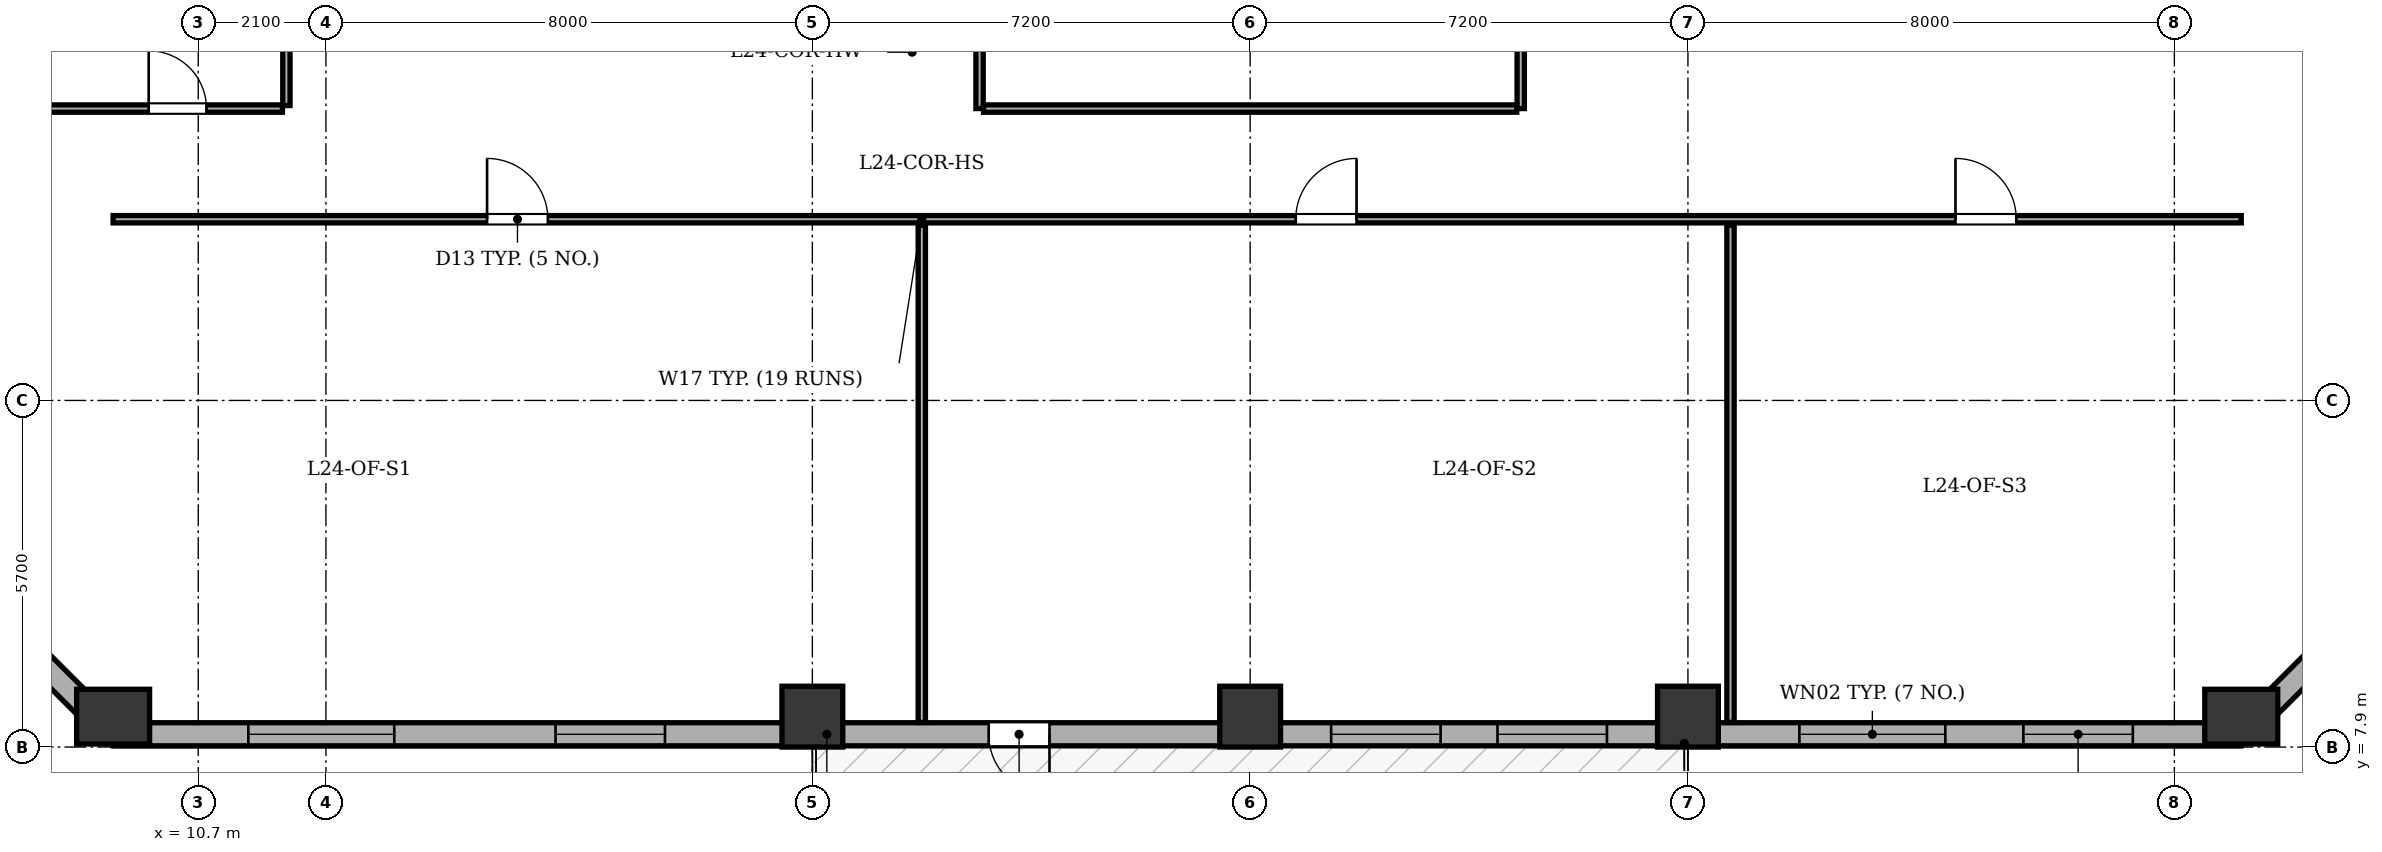
"""IFC4 building model, lengths in metres.
Left out: names, types, materials, properties, quantities, classifications, styles, units other than length and angle.
Written with IfcOpenShell. Run it as: python <this file> out.ifc"""

import sys

from ifc_helpers import new_model, si_unit, direction, frame, frame_2d, origin, origin_2d, place, context, subcontext, project, spatial, rectangle, extrude, element, fill, save


model = new_model("IFC4")
c1 = context("Model", 3, precision=1e-05, world=origin(), true_north=direction((0.0, 1.0)))
c2 = subcontext(c1, "Body", "Model", "MODEL_VIEW")
j1 = project(units=[si_unit("LENGTHUNIT", "METRE"), si_unit("PLANEANGLEUNIT", "RADIAN")], contexts=[c1])
p1 = place(None, origin())
s1 = spatial("IfcSite", under=j1, at=p1, CompositionType="ELEMENT")
p2 = place(p1, origin())
s2 = spatial("IfcBuilding", under=s1, at=p2, CompositionType="ELEMENT")
p3 = place(p2, frame((0.0, 0.0, 98.4)))
s3 = spatial("IfcBuildingStorey", under=s2, at=p3, CompositionType="ELEMENT", Elevation=98.4)
p4 = place(p3, frame((9.3, 8.4, 0.0), z_axis=(0.0, 0.0, 1.0), x_axis=(1.0, 0.0, 0.0)))
e1 = element("IfcColumn", 1, at=p4, inside=s3, PredefinedType="COLUMN", context=c2, shape_type="SweptSolid", body=[
    extrude(rectangle(XDim=0.9, YDim=1.2, at=origin_2d()), origin(), (0.0, 0.0, 1.0), 3.9),
])
for number, where, z_axis, x_axis in (
    (2, (20.8, 8.4, 0.0), (0.0, 0.0, 1.0), (1.0, 0.0, 0.0)),
    (3, (28.0, 8.4, 0.0), (0.0, 0.0, 1.0), (1.0, 0.0, 0.0)),
    (4, (35.2, 8.4, 0.0), (0.0, 0.0, 1.0), (1.0, 0.0, 0.0)),
):
    element("IfcColumn", number, at=place(p3, frame(where, z_axis=z_axis, x_axis=x_axis)), inside=s3, PredefinedType="COLUMN", context=c2, shape_type="SweptSolid", body=[
        extrude(rectangle(XDim=1.0, YDim=1.0, at=origin_2d()), origin(), (0.0, 0.0, 1.0), 3.9),
    ])
p5 = place(p3, frame((44.3, 8.4, 0.0), z_axis=(0.0, 0.0, 1.0), x_axis=(1.0, 0.0, 0.0)))
e5 = element("IfcColumn", 5, at=p5, inside=s3, PredefinedType="COLUMN", context=c2, shape_type="SweptSolid", body=[
    extrude(rectangle(XDim=0.9, YDim=1.2, at=origin_2d()), origin(), (0.0, 0.0, 1.0), 3.9),
])
p6 = place(p3, frame((44.3, 8.11, 0.0), z_axis=(0.0, 0.0, 1.0), x_axis=(-1.0, 0.0, 0.0)))
e6 = element("IfcWall", 6, at=p6, inside=s3, PredefinedType="STANDARD", context=c2, shape_type="SweptSolid", body=[
    extrude(rectangle(XDim=35.0, YDim=0.38, at=frame_2d((17.5, 0.0))), origin(), (0.0, 0.0, 1.0), 3.135),
])
p7 = place(p6, frame((19.6, 0.0, 0.0)))
e7 = element("IfcOpeningElement", 7, at=p7, cuts=e6, PredefinedType="OPENING", context=c2, shape_type="SweptSolid", body=[
    extrude(rectangle(XDim=1.0, YDim=2.02, at=frame_2d((0.5, 1.01))), frame((0.0, 0.2, 0.0), z_axis=(0.0, -1.0, 0.0), x_axis=(1.0, 0.0, 0.0)), (0.0, 0.0, 1.0), 0.4),
])
p8 = place(p6, frame((1.783, 0.0, 0.8)))
e8 = element("IfcOpeningElement", 8, at=p8, cuts=e6, PredefinedType="OPENING", context=c2, shape_type="SweptSolid", body=[
    extrude(rectangle(XDim=1.8, YDim=1.9, at=frame_2d((0.9, 0.95))), frame((0.0, 0.2, 0.0), z_axis=(0.0, -1.0, 0.0), x_axis=(1.0, 0.0, 0.0)), (0.0, 0.0, 1.0), 0.4),
])
p9 = place(p6, frame((4.867, 0.0, 0.8)))
e9 = element("IfcOpeningElement", 9, at=p9, cuts=e6, PredefinedType="OPENING", context=c2, shape_type="SweptSolid", body=[
    extrude(rectangle(XDim=2.4, YDim=1.9, at=frame_2d((1.2, 0.95))), frame((0.0, 0.2, 0.0), z_axis=(0.0, -1.0, 0.0), x_axis=(1.0, 0.0, 0.0)), (0.0, 0.0, 1.0), 0.4),
])
p10 = place(p6, frame((10.432, 0.0, 0.8)))
e10 = element("IfcOpeningElement", 10, at=p10, cuts=e6, PredefinedType="OPENING", context=c2, shape_type="SweptSolid", body=[
    extrude(rectangle(XDim=1.8, YDim=1.9, at=frame_2d((0.9, 0.95))), frame((0.0, 0.2, 0.0), z_axis=(0.0, -1.0, 0.0), x_axis=(1.0, 0.0, 0.0)), (0.0, 0.0, 1.0), 0.4),
])
p11 = place(p6, frame((13.168, 0.0, 0.8)))
e11 = element("IfcOpeningElement", 11, at=p11, cuts=e6, PredefinedType="OPENING", context=c2, shape_type="SweptSolid", body=[
    extrude(rectangle(XDim=1.8, YDim=1.9, at=frame_2d((0.9, 0.95))), frame((0.0, 0.2, 0.0), z_axis=(0.0, -1.0, 0.0), x_axis=(1.0, 0.0, 0.0)), (0.0, 0.0, 1.0), 0.4),
])
p12 = place(p6, frame((25.924, 0.0, 0.8)))
e12 = element("IfcOpeningElement", 12, at=p12, cuts=e6, PredefinedType="OPENING", context=c2, shape_type="SweptSolid", body=[
    extrude(rectangle(XDim=1.8, YDim=1.9, at=frame_2d((0.9, 0.95))), frame((0.0, 0.2, 0.0), z_axis=(0.0, -1.0, 0.0), x_axis=(1.0, 0.0, 0.0)), (0.0, 0.0, 1.0), 0.4),
])
p13 = place(p6, frame((30.376, 0.0, 0.8)))
e13 = element("IfcOpeningElement", 13, at=p13, cuts=e6, PredefinedType="OPENING", context=c2, shape_type="SweptSolid", body=[
    extrude(rectangle(XDim=2.4, YDim=1.9, at=frame_2d((1.2, 0.95))), frame((0.0, 0.2, 0.0), z_axis=(0.0, -1.0, 0.0), x_axis=(1.0, 0.0, 0.0)), (0.0, 0.0, 1.0), 0.4),
])
p14 = place(p3, frame((9.3, 8.11, 0.0), z_axis=(0.0, 0.0, 1.0), x_axis=(-0.707124801467, 0.707088760447, 0.0)))
e14 = element("IfcWall", 14, at=p14, inside=s3, PredefinedType="STANDARD", context=c2, shape_type="SweptSolid", body=[
    extrude(rectangle(XDim=6.774, YDim=0.38, at=frame_2d((3.387, 0.0))), origin(), (0.0, 0.0, 1.0), 3.135),
])
p15 = place(p14, frame((2.687, 0.0, 0.8)))
e15 = element("IfcOpeningElement", 15, at=p15, cuts=e14, PredefinedType="OPENING", context=c2, shape_type="SweptSolid", body=[
    extrude(rectangle(XDim=1.4, YDim=1.65, at=frame_2d((0.7, 0.825))), frame((0.0, 0.2, 0.0), z_axis=(0.0, -1.0, 0.0), x_axis=(1.0, 0.0, 0.0)), (0.0, 0.0, 1.0), 0.4),
])
p16 = place(p3, frame((49.09, 12.9, 0.0), z_axis=(0.0, 0.0, 1.0), x_axis=(-0.707124801467, -0.707088760447, 0.0)))
e16 = element("IfcWall", 16, at=p16, inside=s3, PredefinedType="STANDARD", context=c2, shape_type="SweptSolid", body=[
    extrude(rectangle(XDim=6.774, YDim=0.38, at=frame_2d((3.387, 0.0))), origin(), (0.0, 0.0, 1.0), 3.135),
])
p17 = place(p16, frame((2.687, 0.0, 0.8)))
e17 = element("IfcOpeningElement", 17, at=p17, cuts=e16, PredefinedType="OPENING", context=c2, shape_type="SweptSolid", body=[
    extrude(rectangle(XDim=1.4, YDim=1.65, at=frame_2d((0.7, 0.825))), frame((0.0, 0.2, 0.0), z_axis=(0.0, -1.0, 0.0), x_axis=(1.0, 0.0, 0.0)), (0.0, 0.0, 1.0), 0.4),
])
for number, where, z_axis, x_axis in (
    (18, (23.55, 18.4, 0.0), (0.0, 0.0, 1.0), (0.0, 1.0, 0.0)),
    (19, (32.45, 18.4, 0.0), (0.0, 0.0, 1.0), (0.0, 1.0, 0.0)),
):
    element("IfcWall", number, at=place(p3, frame(where, z_axis=z_axis, x_axis=x_axis)), inside=s3, PredefinedType="PARTITIONING", context=c2, shape_type="SweptSolid", body=[
        extrude(rectangle(XDim=3.485, YDim=0.12, at=frame_2d((1.743, 0.0))), origin(), (0.0, 0.0, 1.0), 3.6),
    ])
p18 = place(p3, frame((23.615, 18.4, 0.0), z_axis=(0.0, 0.0, 1.0), x_axis=(1.0, 0.0, 0.0)))
e20 = element("IfcWall", 20, at=p18, inside=s3, PredefinedType="PARTITIONING", context=c2, shape_type="SweptSolid", body=[
    extrude(rectangle(XDim=8.77, YDim=0.12, at=frame_2d((4.385, 0.0))), origin(), (0.0, 0.0, 1.0), 3.6),
])
p19 = place(p3, frame((9.3, 16.58, 0.0), z_axis=(0.0, 0.0, 1.0), x_axis=(1.0, 0.0, 0.0)))
e21 = element("IfcWall", 21, at=p19, inside=s3, PredefinedType="PARTITIONING", context=c2, shape_type="SweptSolid", body=[
    extrude(rectangle(XDim=35.0, YDim=0.12, at=frame_2d((17.5, 0.0))), origin(), (0.0, 0.0, 1.0), 3.6),
])
p20 = place(p19, frame((6.15, 0.0, 0.0)))
e22 = element("IfcOpeningElement", 22, at=p20, cuts=e21, PredefinedType="OPENING", context=c2, shape_type="SweptSolid", body=[
    extrude(rectangle(XDim=1.0, YDim=2.1, at=frame_2d((0.5, 1.05))), frame((0.0, 0.07, 0.0), z_axis=(0.0, -1.0, 0.0), x_axis=(1.0, 0.0, 0.0)), (0.0, 0.0, 1.0), 0.14),
])
p21 = place(p19, frame((19.45, 0.0, 0.0)))
e23 = element("IfcOpeningElement", 23, at=p21, cuts=e21, PredefinedType="OPENING", context=c2, shape_type="SweptSolid", body=[
    extrude(rectangle(XDim=1.0, YDim=2.1, at=frame_2d((0.5, 1.05))), frame((0.0, 0.07, 0.0), z_axis=(0.0, -1.0, 0.0), x_axis=(1.0, 0.0, 0.0)), (0.0, 0.0, 1.0), 0.14),
])
p22 = place(p19, frame((30.3, 0.0, 0.0)))
e24 = element("IfcOpeningElement", 24, at=p22, cuts=e21, PredefinedType="OPENING", context=c2, shape_type="SweptSolid", body=[
    extrude(rectangle(XDim=1.0, YDim=2.1, at=frame_2d((0.5, 1.05))), frame((0.0, 0.07, 0.0), z_axis=(0.0, -1.0, 0.0), x_axis=(1.0, 0.0, 0.0)), (0.0, 0.0, 1.0), 0.14),
])
p23 = place(p3, frame((22.6, 8.305, 0.0), z_axis=(0.0, 0.0, 1.0), x_axis=(0.0, 1.0, 0.0)))
e25 = element("IfcWall", 25, at=p23, inside=s3, PredefinedType="PARTITIONING", context=c2, shape_type="SweptSolid", body=[
    extrude(rectangle(XDim=8.175, YDim=0.12, at=frame_2d((4.087, 0.0))), origin(), (0.0, 0.0, 1.0), 3.135),
])
p24 = place(p3, frame((35.9, 8.305, 0.0), z_axis=(0.0, 0.0, 1.0), x_axis=(0.0, 1.0, 0.0)))
e26 = element("IfcWall", 26, at=p24, inside=s3, PredefinedType="PARTITIONING", context=c2, shape_type="SweptSolid", body=[
    extrude(rectangle(XDim=8.175, YDim=0.12, at=frame_2d((4.087, 0.0))), origin(), (0.0, 0.0, 1.0), 3.6),
])
p25 = place(p3, frame((12.15, 18.45, 0.0), z_axis=(0.0, 0.0, 1.0), x_axis=(0.0, 1.0, 0.0)))
e27 = element("IfcWall", 27, at=p25, inside=s3, PredefinedType="PARTITIONING", context=c2, shape_type="SweptSolid", body=[
    extrude(rectangle(XDim=17.5, YDim=0.12, at=frame_2d((8.75, 0.0))), origin(), (0.0, 0.0, 1.0), 3.6),
])
p26 = place(p3, frame((4.705, 18.4, 0.0), z_axis=(0.0, 0.0, 1.0), x_axis=(1.0, 0.0, 0.0)))
e28 = element("IfcWall", 28, at=p26, inside=s3, PredefinedType="PARTITIONING", context=c2, shape_type="SweptSolid", body=[
    extrude(rectangle(XDim=7.38, YDim=0.12, at=frame_2d((3.69, 0.0))), origin(), (0.0, 0.0, 1.0), 3.6),
])
p27 = place(p26, frame((5.18, 0.0, 0.0)))
e29 = element("IfcOpeningElement", 29, at=p27, cuts=e28, PredefinedType="OPENING", context=c2, shape_type="SweptSolid", body=[
    extrude(rectangle(XDim=0.95, YDim=2.1, at=frame_2d((0.475, 1.05))), frame((0.0, 0.07, 0.0), z_axis=(0.0, -1.0, 0.0), x_axis=(1.0, 0.0, 0.0)), (0.0, 0.0, 1.0), 0.14),
])
p28 = place(p7, origin())
e30 = element("IfcDoor", 30, at=p28, inside=s3, OperationType="SINGLE_SWING_LEFT", PredefinedType="DOOR", context=c2, shape_type="SweptSolid", body=[
    extrude(rectangle(XDim=1.0, YDim=2.02, at=frame_2d((0.5, 1.01))), frame((0.0, 0.025, 0.0), z_axis=(0.0, -1.0, 0.0), x_axis=(1.0, 0.0, 0.0)), (0.0, 0.0, 1.0), 0.05),
])
fill(e7, e30)
p29 = place(p8, origin())
e31 = element("IfcWindow", 31, at=p29, inside=s3, PartitioningType="SINGLE_PANEL", PredefinedType="WINDOW", context=c2, shape_type="SweptSolid", body=[
    extrude(rectangle(XDim=1.8, YDim=1.9, at=frame_2d((0.9, 0.95))), frame((0.0, -0.01, 0.0), z_axis=(0.0, -1.0, 0.0), x_axis=(1.0, 0.0, 0.0)), (0.0, 0.0, 1.0), 0.06),
])
fill(e8, e31)
p30 = place(p9, origin())
e32 = element("IfcWindow", 32, at=p30, inside=s3, PartitioningType="SINGLE_PANEL", PredefinedType="WINDOW", context=c2, shape_type="SweptSolid", body=[
    extrude(rectangle(XDim=2.4, YDim=1.9, at=frame_2d((1.2, 0.95))), frame((0.0, -0.01, 0.0), z_axis=(0.0, -1.0, 0.0), x_axis=(1.0, 0.0, 0.0)), (0.0, 0.0, 1.0), 0.06),
])
fill(e9, e32)
p31 = place(p10, origin())
e33 = element("IfcWindow", 33, at=p31, inside=s3, PartitioningType="SINGLE_PANEL", PredefinedType="WINDOW", context=c2, shape_type="SweptSolid", body=[
    extrude(rectangle(XDim=1.8, YDim=1.9, at=frame_2d((0.9, 0.95))), frame((0.0, -0.01, 0.0), z_axis=(0.0, -1.0, 0.0), x_axis=(1.0, 0.0, 0.0)), (0.0, 0.0, 1.0), 0.06),
])
fill(e10, e33)
p32 = place(p11, origin())
e34 = element("IfcWindow", 34, at=p32, inside=s3, PartitioningType="SINGLE_PANEL", PredefinedType="WINDOW", context=c2, shape_type="SweptSolid", body=[
    extrude(rectangle(XDim=1.8, YDim=1.9, at=frame_2d((0.9, 0.95))), frame((0.0, -0.01, 0.0), z_axis=(0.0, -1.0, 0.0), x_axis=(1.0, 0.0, 0.0)), (0.0, 0.0, 1.0), 0.06),
])
fill(e11, e34)
p33 = place(p12, origin())
e35 = element("IfcWindow", 35, at=p33, inside=s3, PartitioningType="SINGLE_PANEL", PredefinedType="WINDOW", context=c2, shape_type="SweptSolid", body=[
    extrude(rectangle(XDim=1.8, YDim=1.9, at=frame_2d((0.9, 0.95))), frame((0.0, -0.01, 0.0), z_axis=(0.0, -1.0, 0.0), x_axis=(1.0, 0.0, 0.0)), (0.0, 0.0, 1.0), 0.06),
])
fill(e12, e35)
p34 = place(p13, origin())
e36 = element("IfcWindow", 36, at=p34, inside=s3, PartitioningType="SINGLE_PANEL", PredefinedType="WINDOW", context=c2, shape_type="SweptSolid", body=[
    extrude(rectangle(XDim=2.4, YDim=1.9, at=frame_2d((1.2, 0.95))), frame((0.0, -0.01, 0.0), z_axis=(0.0, -1.0, 0.0), x_axis=(1.0, 0.0, 0.0)), (0.0, 0.0, 1.0), 0.06),
])
fill(e13, e36)
p35 = place(p20, origin())
e37 = element("IfcDoor", 37, at=p35, inside=s3, OperationType="SINGLE_SWING_LEFT", PredefinedType="DOOR", context=c2, shape_type="SweptSolid", body=[
    extrude(rectangle(XDim=1.0, YDim=2.1, at=frame_2d((0.5, 1.05))), frame((0.0, 0.025, 0.0), z_axis=(0.0, -1.0, 0.0), x_axis=(1.0, 0.0, 0.0)), (0.0, 0.0, 1.0), 0.05),
])
fill(e22, e37)
p36 = place(p21, origin())
e38 = element("IfcDoor", 38, at=p36, inside=s3, OperationType="SINGLE_SWING_RIGHT", PredefinedType="DOOR", context=c2, shape_type="SweptSolid", body=[
    extrude(rectangle(XDim=1.0, YDim=2.1, at=frame_2d((0.5, 1.05))), frame((0.0, 0.025, 0.0), z_axis=(0.0, -1.0, 0.0), x_axis=(1.0, 0.0, 0.0)), (0.0, 0.0, 1.0), 0.05),
])
fill(e23, e38)
p37 = place(p22, origin())
e39 = element("IfcDoor", 39, at=p37, inside=s3, OperationType="SINGLE_SWING_LEFT", PredefinedType="DOOR", context=c2, shape_type="SweptSolid", body=[
    extrude(rectangle(XDim=1.0, YDim=2.1, at=frame_2d((0.5, 1.05))), frame((0.0, 0.025, 0.0), z_axis=(0.0, -1.0, 0.0), x_axis=(1.0, 0.0, 0.0)), (0.0, 0.0, 1.0), 0.05),
])
fill(e24, e39)
p38 = place(p27, origin())
e40 = element("IfcDoor", 40, at=p38, inside=s3, OperationType="SINGLE_SWING_LEFT", PredefinedType="DOOR", context=c2, shape_type="SweptSolid", body=[
    extrude(rectangle(XDim=0.95, YDim=2.1, at=frame_2d((0.475, 1.05))), frame((0.0, 0.025, 0.0), z_axis=(0.0, -1.0, 0.0), x_axis=(1.0, 0.0, 0.0)), (0.0, 0.0, 1.0), 0.05),
])
fill(e29, e40)
save(model, sys.argv[1])
